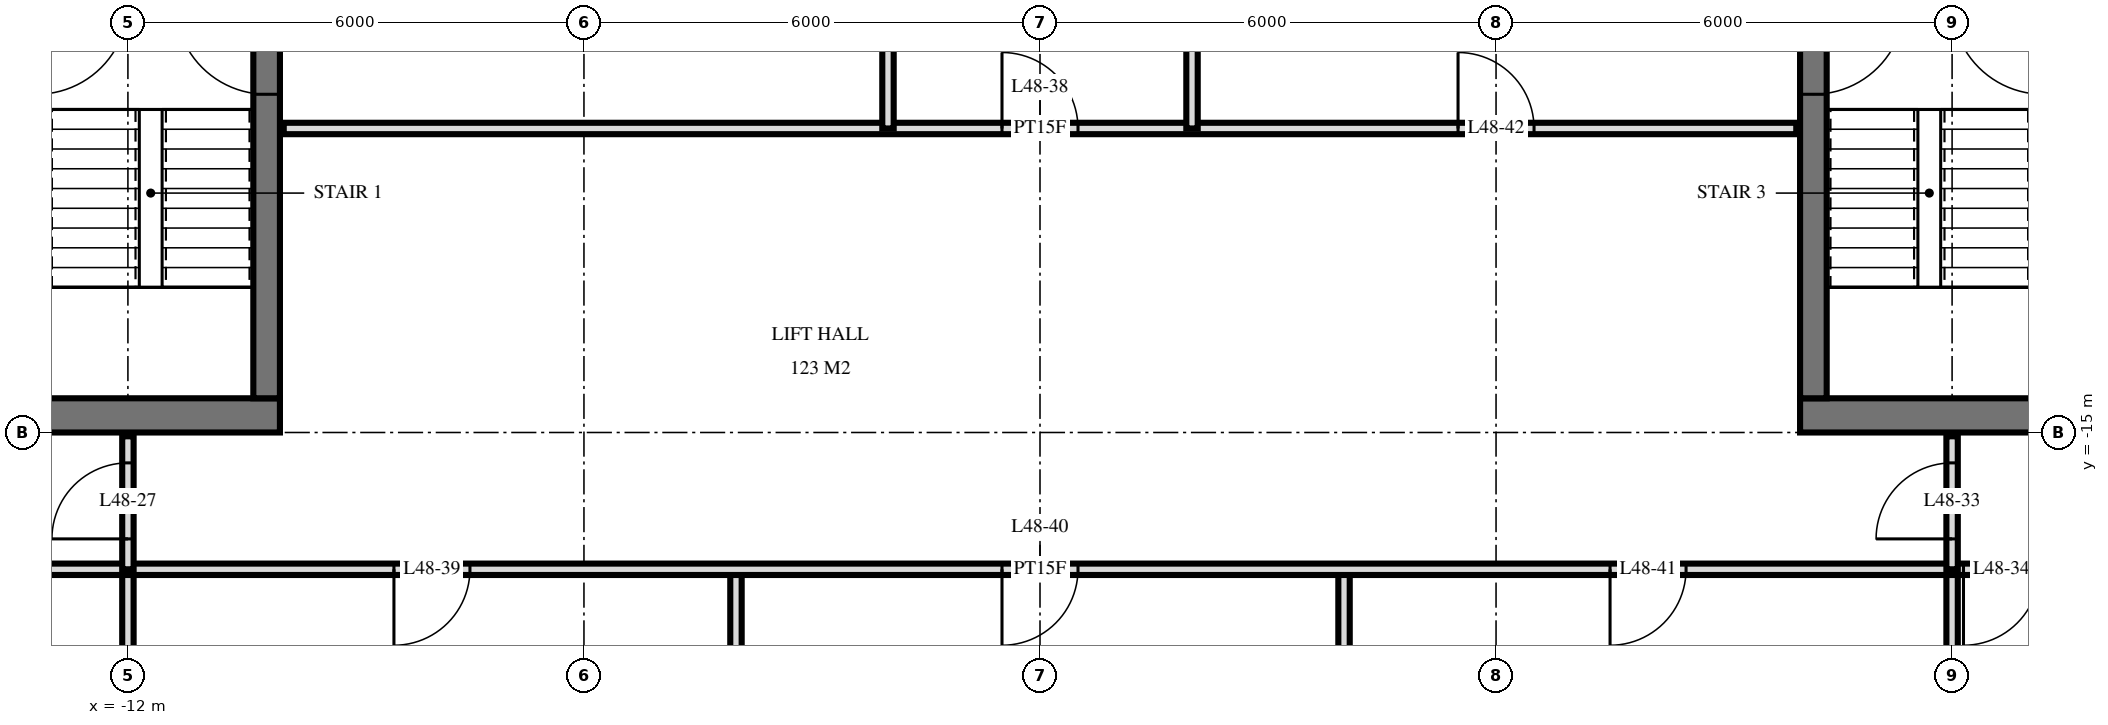
"""IFC4 building model, lengths in metres.
Left out: names, types, materials, properties, quantities, classifications, styles, units other than length and angle.
Written with IfcOpenShell. Run it as: python <this file> out.ifc"""

import sys

from ifc_helpers import new_model, si_unit, direction, frame, frame_2d, origin, place, context, subcontext, project, spatial, rectangle, extrude, element, fill, save


model = new_model("IFC4")
c1 = context("Model", 3, precision=1e-05, world=origin(), true_north=direction((0.0, 1.0)))
c2 = subcontext(c1, "Body", "Model", "MODEL_VIEW")
j1 = project(units=[si_unit("LENGTHUNIT", "METRE"), si_unit("PLANEANGLEUNIT", "RADIAN")], contexts=[c1])
p1 = place(None, origin())
s1 = spatial("IfcSite", under=j1, at=p1, CompositionType="ELEMENT")
p2 = place(p1, origin())
s2 = spatial("IfcBuilding", under=s1, at=p2, CompositionType="ELEMENT")
p3 = place(p2, frame((0.0, 0.0, 187.1)))
s3 = spatial("IfcBuildingStorey", under=s2, at=p3, CompositionType="ELEMENT", Elevation=187.1)
p4 = place(p3, frame((-24.5, -14.775, 0.0), z_axis=(0.0, 0.0, 1.0), x_axis=(1.0, 0.0, 0.0)))
e1 = element("IfcWall", 1, at=p4, inside=s3, PredefinedType="SHEAR", context=c2, shape_type="SweptSolid", body=[
    extrude(rectangle(XDim=14.5, YDim=0.45, at=frame_2d((7.25, 0.0))), origin(), (0.0, 0.0, 1.0), 3.5),
])
p5 = place(p4, frame((6.2, 0.0, 0.0)))
e2 = element("IfcOpeningElement", 2, at=p5, cuts=e1, PredefinedType="OPENING", context=c2, shape_type="SweptSolid", body=[
    extrude(rectangle(XDim=1.2, YDim=2.1, at=frame_2d((0.6, 1.05))), frame((0.0, 0.235, 0.0), z_axis=(0.0, -1.0, 0.0), x_axis=(1.0, 0.0, 0.0)), (0.0, 0.0, 1.0), 0.47),
])
p6 = place(p4, frame((9.25, 0.0, 0.0)))
e3 = element("IfcOpeningElement", 3, at=p6, cuts=e1, PredefinedType="OPENING", context=c2, shape_type="SweptSolid", body=[
    extrude(rectangle(XDim=1.1, YDim=2.1, at=frame_2d((0.55, 1.05))), frame((0.0, 0.235, 0.0), z_axis=(0.0, -1.0, 0.0), x_axis=(1.0, 0.0, 0.0)), (0.0, 0.0, 1.0), 0.47),
])
p7 = place(p4, frame((3.5, 0.0, 0.0)))
e4 = element("IfcOpeningElement", 4, at=p7, cuts=e1, PredefinedType="OPENING", context=c2, shape_type="SweptSolid", body=[
    extrude(rectangle(XDim=0.9, YDim=2.1, at=frame_2d((0.45, 1.05))), frame((0.0, 0.235, 0.0), z_axis=(0.0, -1.0, 0.0), x_axis=(1.0, 0.0, 0.0)), (0.0, 0.0, 1.0), 0.47),
])
p8 = place(p4, frame((1.05, 0.0, 0.0)))
e5 = element("IfcOpeningElement", 5, at=p8, cuts=e1, PredefinedType="OPENING", context=c2, shape_type="SweptSolid", body=[
    extrude(rectangle(XDim=1.0, YDim=2.1, at=frame_2d((0.5, 1.05))), frame((0.0, 0.235, 0.0), z_axis=(0.0, -1.0, 0.0), x_axis=(1.0, 0.0, 0.0)), (0.0, 0.0, 1.0), 0.47),
])
p9 = place(p3, frame((-10.175, -14.55, 0.0), z_axis=(0.0, 0.0, 1.0), x_axis=(0.0, 1.0, 0.0)))
e6 = element("IfcWall", 6, at=p9, inside=s3, PredefinedType="SHEAR", context=c2, shape_type="SweptSolid", body=[
    extrude(rectangle(XDim=14.1, YDim=0.35, at=frame_2d((7.05, 0.0))), origin(), (0.0, 0.0, 1.0), 3.5),
])
p10 = place(p9, frame((8.4, 0.0, 0.0)))
e7 = element("IfcOpeningElement", 7, at=p10, cuts=e6, PredefinedType="OPENING", context=c2, shape_type="SweptSolid", body=[
    extrude(rectangle(XDim=1.4, YDim=2.4, at=frame_2d((0.7, 1.2))), frame((0.0, 0.185, 0.0), z_axis=(0.0, -1.0, 0.0), x_axis=(1.0, 0.0, 0.0)), (0.0, 0.0, 1.0), 0.37),
])
p11 = place(p9, frame((10.0, 0.0, 0.0)))
e8 = element("IfcOpeningElement", 8, at=p11, cuts=e6, PredefinedType="OPENING", context=c2, shape_type="SweptSolid", body=[
    extrude(rectangle(XDim=1.4, YDim=2.4, at=frame_2d((0.7, 1.2))), frame((0.0, 0.185, 0.0), z_axis=(0.0, -1.0, 0.0), x_axis=(1.0, 0.0, 0.0)), (0.0, 0.0, 1.0), 0.37),
])
p12 = place(p9, frame((4.0, 0.0, 0.0)))
e9 = element("IfcOpeningElement", 9, at=p12, cuts=e6, PredefinedType="OPENING", context=c2, shape_type="SweptSolid", body=[
    extrude(rectangle(XDim=1.2, YDim=2.1, at=frame_2d((0.6, 1.05))), frame((0.0, 0.185, 0.0), z_axis=(0.0, -1.0, 0.0), x_axis=(1.0, 0.0, 0.0)), (0.0, 0.0, 1.0), 0.37),
])
p13 = place(p3, frame((10.0, -14.775, 0.0), z_axis=(0.0, 0.0, 1.0), x_axis=(1.0, 0.0, 0.0)))
e10 = element("IfcWall", 10, at=p13, inside=s3, PredefinedType="SHEAR", context=c2, shape_type="SweptSolid", body=[
    extrude(rectangle(XDim=14.5, YDim=0.45, at=frame_2d((7.25, 0.0))), origin(), (0.0, 0.0, 1.0), 3.5),
])
p14 = place(p13, frame((7.1, 0.0, 0.0)))
e11 = element("IfcOpeningElement", 11, at=p14, cuts=e10, PredefinedType="OPENING", context=c2, shape_type="SweptSolid", body=[
    extrude(rectangle(XDim=1.2, YDim=2.1, at=frame_2d((0.6, 1.05))), frame((0.0, 0.235, 0.0), z_axis=(0.0, -1.0, 0.0), x_axis=(1.0, 0.0, 0.0)), (0.0, 0.0, 1.0), 0.47),
])
p15 = place(p13, frame((4.15, 0.0, 0.0)))
e12 = element("IfcOpeningElement", 12, at=p15, cuts=e10, PredefinedType="OPENING", context=c2, shape_type="SweptSolid", body=[
    extrude(rectangle(XDim=1.1, YDim=2.1, at=frame_2d((0.55, 1.05))), frame((0.0, 0.235, 0.0), z_axis=(0.0, -1.0, 0.0), x_axis=(1.0, 0.0, 0.0)), (0.0, 0.0, 1.0), 0.47),
])
p16 = place(p13, frame((10.1, 0.0, 0.0)))
e13 = element("IfcOpeningElement", 13, at=p16, cuts=e10, PredefinedType="OPENING", context=c2, shape_type="SweptSolid", body=[
    extrude(rectangle(XDim=0.9, YDim=2.1, at=frame_2d((0.45, 1.05))), frame((0.0, 0.235, 0.0), z_axis=(0.0, -1.0, 0.0), x_axis=(1.0, 0.0, 0.0)), (0.0, 0.0, 1.0), 0.47),
])
p17 = place(p13, frame((12.45, 0.0, 0.0)))
e14 = element("IfcOpeningElement", 14, at=p17, cuts=e10, PredefinedType="OPENING", context=c2, shape_type="SweptSolid", body=[
    extrude(rectangle(XDim=1.0, YDim=2.1, at=frame_2d((0.5, 1.05))), frame((0.0, 0.235, 0.0), z_axis=(0.0, -1.0, 0.0), x_axis=(1.0, 0.0, 0.0)), (0.0, 0.0, 1.0), 0.47),
])
p18 = place(p3, frame((10.175, -14.55, 0.0), z_axis=(0.0, 0.0, 1.0), x_axis=(0.0, 1.0, 0.0)))
e15 = element("IfcWall", 15, at=p18, inside=s3, PredefinedType="SHEAR", context=c2, shape_type="SweptSolid", body=[
    extrude(rectangle(XDim=14.1, YDim=0.35, at=frame_2d((7.05, 0.0))), origin(), (0.0, 0.0, 1.0), 3.5),
])
p19 = place(p18, frame((8.4, 0.0, 0.0)))
e16 = element("IfcOpeningElement", 16, at=p19, cuts=e15, PredefinedType="OPENING", context=c2, shape_type="SweptSolid", body=[
    extrude(rectangle(XDim=1.4, YDim=2.4, at=frame_2d((0.7, 1.2))), frame((0.0, 0.185, 0.0), z_axis=(0.0, -1.0, 0.0), x_axis=(1.0, 0.0, 0.0)), (0.0, 0.0, 1.0), 0.37),
])
p20 = place(p18, frame((10.0, 0.0, 0.0)))
e17 = element("IfcOpeningElement", 17, at=p20, cuts=e15, PredefinedType="OPENING", context=c2, shape_type="SweptSolid", body=[
    extrude(rectangle(XDim=1.4, YDim=2.4, at=frame_2d((0.7, 1.2))), frame((0.0, 0.185, 0.0), z_axis=(0.0, -1.0, 0.0), x_axis=(1.0, 0.0, 0.0)), (0.0, 0.0, 1.0), 0.37),
])
p21 = place(p18, frame((4.0, 0.0, 0.0)))
e18 = element("IfcOpeningElement", 18, at=p21, cuts=e15, PredefinedType="OPENING", context=c2, shape_type="SweptSolid", body=[
    extrude(rectangle(XDim=1.2, YDim=2.1, at=frame_2d((0.6, 1.05))), frame((0.0, 0.185, 0.0), z_axis=(0.0, -1.0, 0.0), x_axis=(1.0, 0.0, 0.0)), (0.0, 0.0, 1.0), 0.37),
])
p22 = place(p3, frame((12.0, -16.8, 0.0), z_axis=(0.0, 0.0, 1.0), x_axis=(0.0, 1.0, 0.0)))
e19 = element("IfcWall", 19, at=p22, inside=s3, PredefinedType="PARTITIONING", context=c2, shape_type="SweptSolid", body=[
    extrude(rectangle(XDim=1.75, YDim=0.15, at=frame_2d((0.875, 0.0))), origin(), (0.0, 0.0, 1.0), 3.22),
])
p23 = place(p22, frame((0.4, 0.0, 0.0)))
e20 = element("IfcOpeningElement", 20, at=p23, cuts=e19, PredefinedType="OPENING", context=c2, shape_type="SweptSolid", body=[
    extrude(rectangle(XDim=1.0, YDim=2.1, at=frame_2d((0.5, 1.05))), frame((0.0, 0.085, 0.0), z_axis=(0.0, -1.0, 0.0), x_axis=(1.0, 0.0, 0.0)), (0.0, 0.0, 1.0), 0.17),
])
for number, where, z_axis, x_axis in (
    (21, (12.0, -29.22, 0.0), (0.0, 0.0, 1.0), (0.0, 1.0, 0.0)),
    (22, (4.0, -29.22, 0.0), (0.0, 0.0, 1.0), (0.0, 1.0, 0.0)),
):
    element("IfcWall", number, at=place(p3, frame(where, z_axis=z_axis, x_axis=x_axis)), inside=s3, PredefinedType="PARTITIONING", context=c2, shape_type="SweptSolid", body=[
        extrude(rectangle(XDim=12.42, YDim=0.15, at=frame_2d((6.21, 0.0))), origin(), (0.0, 0.0, 1.0), 3.22),
    ])
for number, where, z_axis, x_axis in (
    (23, (2.0, -11.0, 0.0), (0.0, 0.0, 1.0), (0.0, 1.0, 0.0)),
    (24, (-2.0, -11.0, 0.0), (0.0, 0.0, 1.0), (0.0, 1.0, 0.0)),
):
    element("IfcWall", number, at=place(p3, frame(where, z_axis=z_axis, x_axis=x_axis)), inside=s3, PredefinedType="PARTITIONING", context=c2, shape_type="SweptSolid", body=[
        extrude(rectangle(XDim=4.0, YDim=0.15, at=frame_2d((2.0, 0.0))), origin(), (0.0, 0.0, 1.0), 3.22),
    ])
p24 = place(p3, frame((-4.0, -29.22, 0.0), z_axis=(0.0, 0.0, 1.0), x_axis=(0.0, 1.0, 0.0)))
e25 = element("IfcWall", 25, at=p24, inside=s3, PredefinedType="PARTITIONING", context=c2, shape_type="SweptSolid", body=[
    extrude(rectangle(XDim=12.42, YDim=0.15, at=frame_2d((6.21, 0.0))), origin(), (0.0, 0.0, 1.0), 3.22),
])
p25 = place(p3, frame((-12.0, -16.8, 0.0), z_axis=(0.0, 0.0, 1.0), x_axis=(0.0, 1.0, 0.0)))
e26 = element("IfcWall", 26, at=p25, inside=s3, PredefinedType="PARTITIONING", context=c2, shape_type="SweptSolid", body=[
    extrude(rectangle(XDim=1.75, YDim=0.15, at=frame_2d((0.875, 0.0))), origin(), (0.0, 0.0, 1.0), 3.22),
])
p26 = place(p25, frame((0.4, 0.0, 0.0)))
e27 = element("IfcOpeningElement", 27, at=p26, cuts=e26, PredefinedType="OPENING", context=c2, shape_type="SweptSolid", body=[
    extrude(rectangle(XDim=1.0, YDim=2.1, at=frame_2d((0.5, 1.05))), frame((0.0, 0.085, 0.0), z_axis=(0.0, -1.0, 0.0), x_axis=(1.0, 0.0, 0.0)), (0.0, 0.0, 1.0), 0.17),
])
p27 = place(p3, frame((-12.0, -29.22, 0.0), z_axis=(0.0, 0.0, 1.0), x_axis=(0.0, 1.0, 0.0)))
e28 = element("IfcWall", 28, at=p27, inside=s3, PredefinedType="PARTITIONING", context=c2, shape_type="SweptSolid", body=[
    extrude(rectangle(XDim=12.42, YDim=0.15, at=frame_2d((6.21, 0.0))), origin(), (0.0, 0.0, 1.0), 3.22),
])
p28 = place(p3, frame((-26.82, -16.8, 0.0), z_axis=(0.0, 0.0, 1.0), x_axis=(1.0, 0.0, 0.0)))
e29 = element("IfcWall", 29, at=p28, inside=s3, PredefinedType="PARTITIONING", context=c2, shape_type="SweptSolid", body=[
    extrude(rectangle(XDim=53.64, YDim=0.15, at=frame_2d((26.82, 0.0))), origin(), (0.0, 0.0, 1.0), 3.22),
])
p29 = place(p28, frame((11.97, 0.0, 0.0)))
e30 = element("IfcOpeningElement", 30, at=p29, cuts=e29, PredefinedType="OPENING", context=c2, shape_type="SweptSolid", body=[
    extrude(rectangle(XDim=1.0, YDim=2.1, at=frame_2d((0.5, 1.05))), frame((0.0, 0.085, 0.0), z_axis=(0.0, -1.0, 0.0), x_axis=(1.0, 0.0, 0.0)), (0.0, 0.0, 1.0), 0.17),
])
p30 = place(p28, frame((10.67, 0.0, 0.0)))
e31 = element("IfcOpeningElement", 31, at=p30, cuts=e29, PredefinedType="OPENING", context=c2, shape_type="SweptSolid", body=[
    extrude(rectangle(XDim=1.0, YDim=2.1, at=frame_2d((0.5, 1.05))), frame((0.0, 0.085, 0.0), z_axis=(0.0, -1.0, 0.0), x_axis=(1.0, 0.0, 0.0)), (0.0, 0.0, 1.0), 0.17),
])
p31 = place(p28, frame((3.22, 0.0, 0.0)))
e32 = element("IfcOpeningElement", 32, at=p31, cuts=e29, PredefinedType="OPENING", context=c2, shape_type="SweptSolid", body=[
    extrude(rectangle(XDim=1.0, YDim=2.1, at=frame_2d((0.5, 1.05))), frame((0.0, 0.085, 0.0), z_axis=(0.0, -1.0, 0.0), x_axis=(1.0, 0.0, 0.0)), (0.0, 0.0, 1.0), 0.17),
])
p32 = place(p28, frame((5.02, 0.0, 0.0)))
e33 = element("IfcOpeningElement", 33, at=p32, cuts=e29, PredefinedType="OPENING", context=c2, shape_type="SweptSolid", body=[
    extrude(rectangle(XDim=1.0, YDim=2.1, at=frame_2d((0.5, 1.05))), frame((0.0, 0.085, 0.0), z_axis=(0.0, -1.0, 0.0), x_axis=(1.0, 0.0, 0.0)), (0.0, 0.0, 1.0), 0.17),
])
p33 = place(p28, frame((38.97, 0.0, 0.0)))
e34 = element("IfcOpeningElement", 34, at=p33, cuts=e29, PredefinedType="OPENING", context=c2, shape_type="SweptSolid", body=[
    extrude(rectangle(XDim=1.0, YDim=2.1, at=frame_2d((0.5, 1.05))), frame((0.0, 0.085, 0.0), z_axis=(0.0, -1.0, 0.0), x_axis=(1.0, 0.0, 0.0)), (0.0, 0.0, 1.0), 0.17),
])
p34 = place(p28, frame((48.72, 0.0, 0.0)))
e35 = element("IfcOpeningElement", 35, at=p34, cuts=e29, PredefinedType="OPENING", context=c2, shape_type="SweptSolid", body=[
    extrude(rectangle(XDim=1.0, YDim=2.1, at=frame_2d((0.5, 1.05))), frame((0.0, 0.085, 0.0), z_axis=(0.0, -1.0, 0.0), x_axis=(1.0, 0.0, 0.0)), (0.0, 0.0, 1.0), 0.17),
])
p35 = place(p28, frame((46.92, 0.0, 0.0)))
e36 = element("IfcOpeningElement", 36, at=p35, cuts=e29, PredefinedType="OPENING", context=c2, shape_type="SweptSolid", body=[
    extrude(rectangle(XDim=1.0, YDim=2.1, at=frame_2d((0.5, 1.05))), frame((0.0, 0.085, 0.0), z_axis=(0.0, -1.0, 0.0), x_axis=(1.0, 0.0, 0.0)), (0.0, 0.0, 1.0), 0.17),
])
p36 = place(p28, frame((18.32, 0.0, 0.0)))
e37 = element("IfcOpeningElement", 37, at=p36, cuts=e29, PredefinedType="OPENING", context=c2, shape_type="SweptSolid", body=[
    extrude(rectangle(XDim=1.0, YDim=2.1, at=frame_2d((0.5, 1.05))), frame((0.0, 0.085, 0.0), z_axis=(0.0, -1.0, 0.0), x_axis=(1.0, 0.0, 0.0)), (0.0, 0.0, 1.0), 0.17),
])
p37 = place(p28, frame((26.32, 0.0, 0.0)))
e38 = element("IfcOpeningElement", 38, at=p37, cuts=e29, PredefinedType="OPENING", context=c2, shape_type="SweptSolid", body=[
    extrude(rectangle(XDim=1.0, YDim=2.1, at=frame_2d((0.5, 1.05))), frame((0.0, 0.085, 0.0), z_axis=(0.0, -1.0, 0.0), x_axis=(1.0, 0.0, 0.0)), (0.0, 0.0, 1.0), 0.17),
])
p38 = place(p28, frame((34.32, 0.0, 0.0)))
e39 = element("IfcOpeningElement", 39, at=p38, cuts=e29, PredefinedType="OPENING", context=c2, shape_type="SweptSolid", body=[
    extrude(rectangle(XDim=1.0, YDim=2.1, at=frame_2d((0.5, 1.05))), frame((0.0, 0.085, 0.0), z_axis=(0.0, -1.0, 0.0), x_axis=(1.0, 0.0, 0.0)), (0.0, 0.0, 1.0), 0.17),
])
p39 = place(p3, frame((-9.95, -11.0, 0.0), z_axis=(0.0, 0.0, 1.0), x_axis=(1.0, 0.0, 0.0)))
e40 = element("IfcWall", 40, at=p39, inside=s3, PredefinedType="PARTITIONING", context=c2, shape_type="SweptSolid", body=[
    extrude(rectangle(XDim=19.9, YDim=0.15, at=frame_2d((9.95, 0.0))), origin(), (0.0, 0.0, 1.0), 3.22),
])
p40 = place(p39, frame((9.45, 0.0, 0.0)))
e41 = element("IfcOpeningElement", 41, at=p40, cuts=e40, PredefinedType="OPENING", context=c2, shape_type="SweptSolid", body=[
    extrude(rectangle(XDim=1.0, YDim=2.1, at=frame_2d((0.5, 1.05))), frame((0.0, 0.085, 0.0), z_axis=(0.0, -1.0, 0.0), x_axis=(1.0, 0.0, 0.0)), (0.0, 0.0, 1.0), 0.17),
])
p41 = place(p39, frame((15.45, 0.0, 0.0)))
e42 = element("IfcOpeningElement", 42, at=p41, cuts=e40, PredefinedType="OPENING", context=c2, shape_type="SweptSolid", body=[
    extrude(rectangle(XDim=1.0, YDim=2.1, at=frame_2d((0.5, 1.05))), frame((0.0, 0.085, 0.0), z_axis=(0.0, -1.0, 0.0), x_axis=(1.0, 0.0, 0.0)), (0.0, 0.0, 1.0), 0.17),
])
p42 = place(p12, origin())
e43 = element("IfcDoor", 43, at=p42, inside=s3, OperationType="SINGLE_SWING_LEFT", PredefinedType="DOOR", context=c2, shape_type="SweptSolid", body=[
    extrude(rectangle(XDim=1.2, YDim=2.1, at=frame_2d((0.6, 1.05))), frame((0.0, 0.025, 0.0), z_axis=(0.0, -1.0, 0.0), x_axis=(1.0, 0.0, 0.0)), (0.0, 0.0, 1.0), 0.05),
])
fill(e9, e43)
p43 = place(p21, frame((0.6, 0.0, 0.0), z_axis=(0.0, 0.0, 1.0), x_axis=(-1.0, 0.0, 0.0)))
e44 = element("IfcDoor", 44, at=p43, inside=s3, OperationType="SINGLE_SWING_RIGHT", PredefinedType="DOOR", context=c2, shape_type="SweptSolid", body=[
    extrude(rectangle(XDim=1.2, YDim=2.1, at=frame_2d((0.0, 1.05))), frame((0.0, -0.025, 0.0), z_axis=(0.0, 1.0, 0.0), x_axis=(-1.0, 0.0, 0.0)), (0.0, 0.0, 1.0), 0.05),
])
fill(e18, e44)
p44 = place(p26, origin())
e45 = element("IfcDoor", 45, at=p44, inside=s3, OperationType="SINGLE_SWING_RIGHT", PredefinedType="DOOR", context=c2, shape_type="SweptSolid", body=[
    extrude(rectangle(XDim=1.0, YDim=2.1, at=frame_2d((0.5, 1.05))), frame((0.0, 0.025, 0.0), z_axis=(0.0, -1.0, 0.0), x_axis=(1.0, 0.0, 0.0)), (0.0, 0.0, 1.0), 0.05),
])
fill(e27, e45)
p45 = place(p23, origin())
e46 = element("IfcDoor", 46, at=p45, inside=s3, OperationType="SINGLE_SWING_RIGHT", PredefinedType="DOOR", context=c2, shape_type="SweptSolid", body=[
    extrude(rectangle(XDim=1.0, YDim=2.1, at=frame_2d((0.5, 1.05))), frame((0.0, 0.025, 0.0), z_axis=(0.0, -1.0, 0.0), x_axis=(1.0, 0.0, 0.0)), (0.0, 0.0, 1.0), 0.05),
])
fill(e20, e46)
p46 = place(p33, frame((0.5, 0.0, 0.0), z_axis=(0.0, 0.0, 1.0), x_axis=(-1.0, 0.0, 0.0)))
e47 = element("IfcDoor", 47, at=p46, inside=s3, OperationType="SINGLE_SWING_LEFT", PredefinedType="DOOR", context=c2, shape_type="SweptSolid", body=[
    extrude(rectangle(XDim=1.0, YDim=2.1, at=frame_2d((0.0, 1.05))), frame((0.0, -0.025, 0.0), z_axis=(0.0, 1.0, 0.0), x_axis=(-1.0, 0.0, 0.0)), (0.0, 0.0, 1.0), 0.05),
])
fill(e34, e47)
p47 = place(p40, origin())
e48 = element("IfcDoor", 48, at=p47, inside=s3, OperationType="SINGLE_SWING_RIGHT", PredefinedType="DOOR", context=c2, shape_type="SweptSolid", body=[
    extrude(rectangle(XDim=1.0, YDim=2.1, at=frame_2d((0.5, 1.05))), frame((0.0, 0.025, 0.0), z_axis=(0.0, -1.0, 0.0), x_axis=(1.0, 0.0, 0.0)), (0.0, 0.0, 1.0), 0.05),
])
fill(e41, e48)
p48 = place(p36, frame((0.5, 0.0, 0.0), z_axis=(0.0, 0.0, 1.0), x_axis=(-1.0, 0.0, 0.0)))
e49 = element("IfcDoor", 49, at=p48, inside=s3, OperationType="SINGLE_SWING_LEFT", PredefinedType="DOOR", context=c2, shape_type="SweptSolid", body=[
    extrude(rectangle(XDim=1.0, YDim=2.1, at=frame_2d((0.0, 1.05))), frame((0.0, -0.025, 0.0), z_axis=(0.0, 1.0, 0.0), x_axis=(-1.0, 0.0, 0.0)), (0.0, 0.0, 1.0), 0.05),
])
fill(e37, e49)
p49 = place(p37, frame((0.5, 0.0, 0.0), z_axis=(0.0, 0.0, 1.0), x_axis=(-1.0, 0.0, 0.0)))
e50 = element("IfcDoor", 50, at=p49, inside=s3, OperationType="SINGLE_SWING_LEFT", PredefinedType="DOOR", context=c2, shape_type="SweptSolid", body=[
    extrude(rectangle(XDim=1.0, YDim=2.1, at=frame_2d((0.0, 1.05))), frame((0.0, -0.025, 0.0), z_axis=(0.0, 1.0, 0.0), x_axis=(-1.0, 0.0, 0.0)), (0.0, 0.0, 1.0), 0.05),
])
fill(e38, e50)
p50 = place(p38, frame((0.5, 0.0, 0.0), z_axis=(0.0, 0.0, 1.0), x_axis=(-1.0, 0.0, 0.0)))
e51 = element("IfcDoor", 51, at=p50, inside=s3, OperationType="SINGLE_SWING_LEFT", PredefinedType="DOOR", context=c2, shape_type="SweptSolid", body=[
    extrude(rectangle(XDim=1.0, YDim=2.1, at=frame_2d((0.0, 1.05))), frame((0.0, -0.025, 0.0), z_axis=(0.0, 1.0, 0.0), x_axis=(-1.0, 0.0, 0.0)), (0.0, 0.0, 1.0), 0.05),
])
fill(e39, e51)
p51 = place(p41, origin())
e52 = element("IfcDoor", 52, at=p51, inside=s3, OperationType="SINGLE_SWING_RIGHT", PredefinedType="DOOR", context=c2, shape_type="SweptSolid", body=[
    extrude(rectangle(XDim=1.0, YDim=2.1, at=frame_2d((0.5, 1.05))), frame((0.0, 0.025, 0.0), z_axis=(0.0, -1.0, 0.0), x_axis=(1.0, 0.0, 0.0)), (0.0, 0.0, 1.0), 0.05),
])
fill(e42, e52)
save(model, sys.argv[1])
